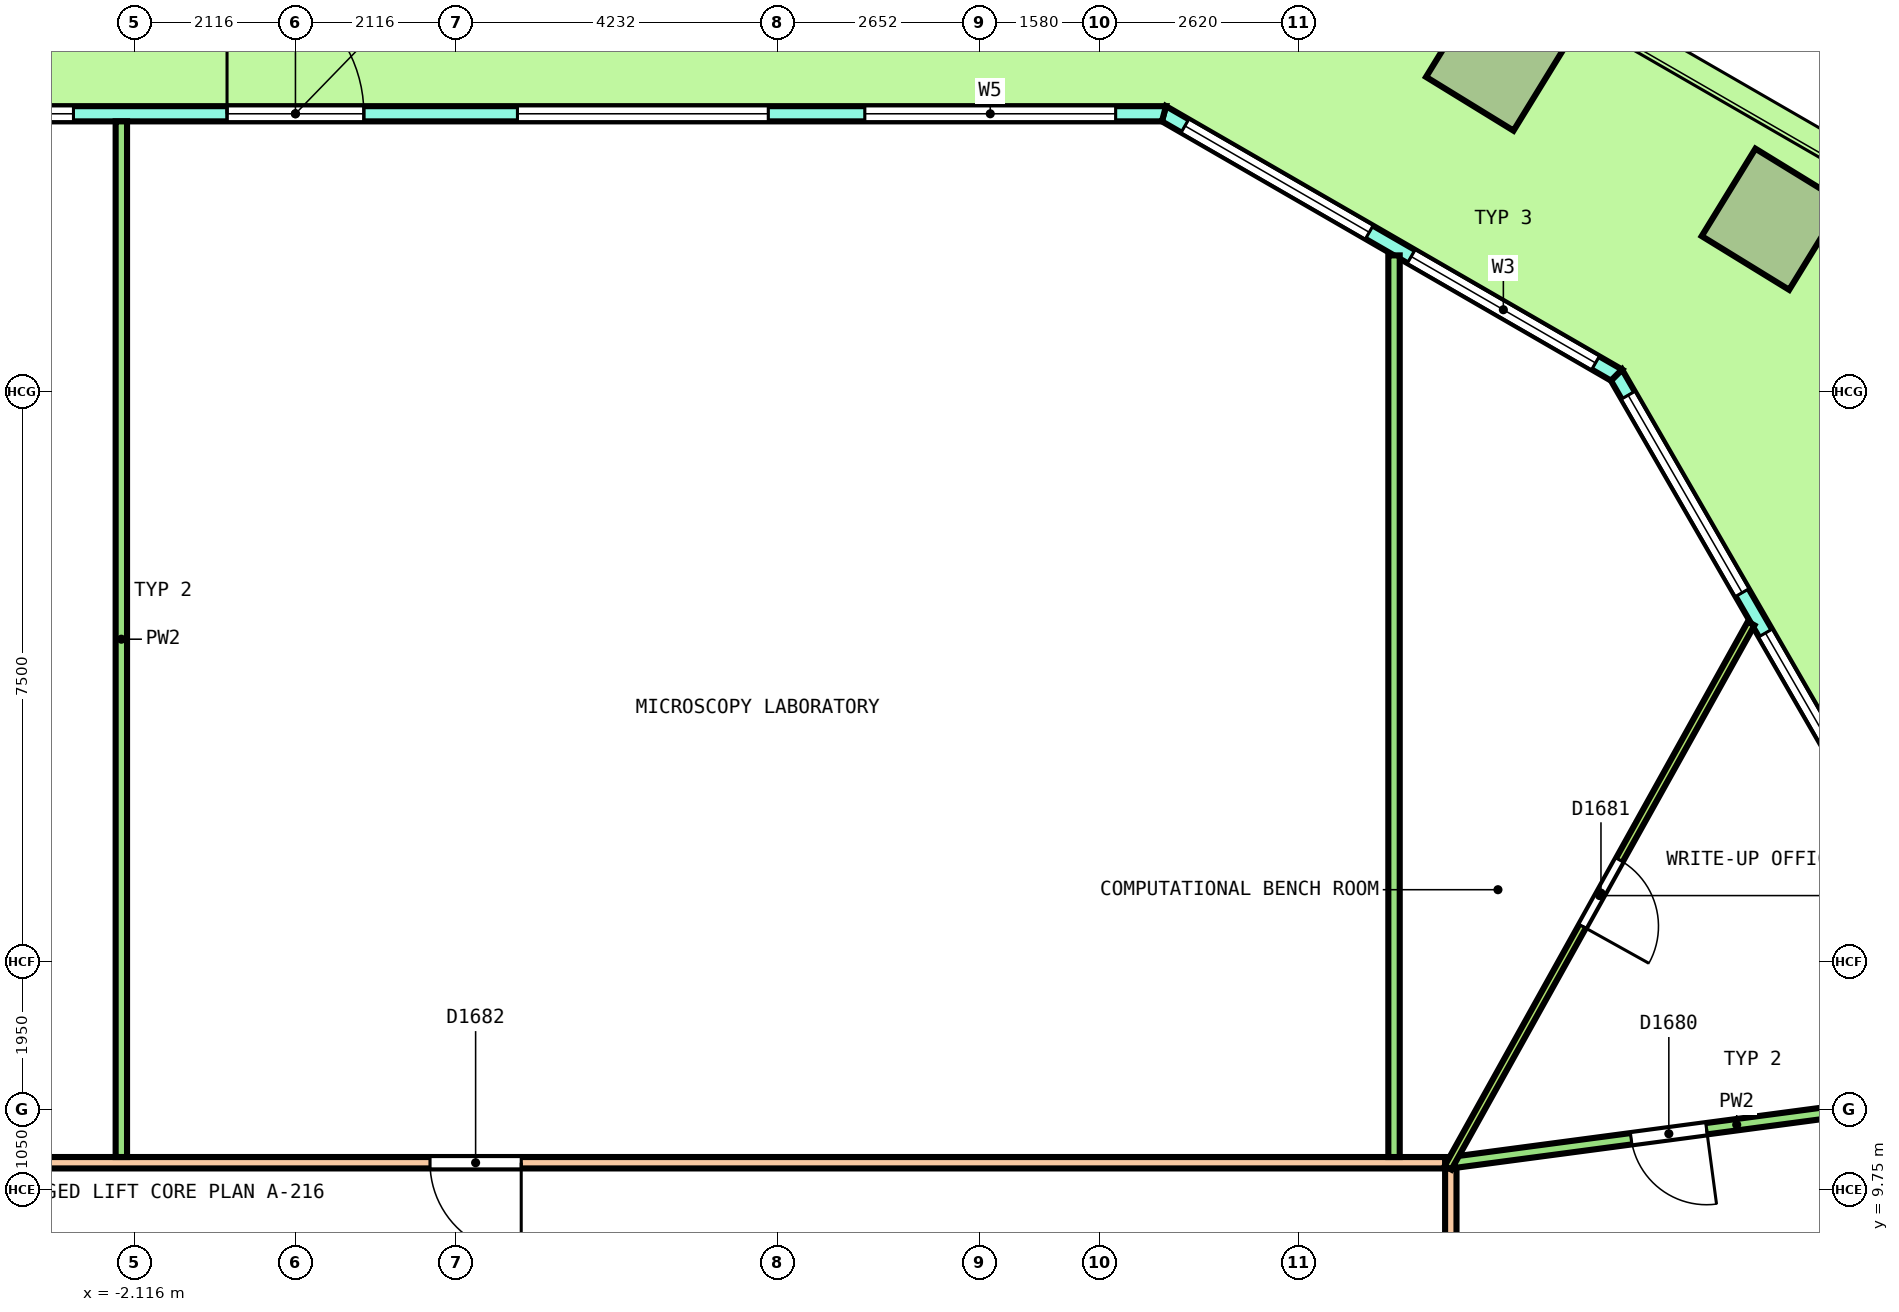
"""IFC4 building model, lengths in metres.
Left out: names, types, materials, properties, quantities, classifications, styles, units other than length and angle.
Written with IfcOpenShell. Run it as: python <this file> out.ifc"""

import sys

from ifc_helpers import new_model, si_unit, direction, frame, frame_2d, origin, origin_2d, place, context, subcontext, project, spatial, polyline, rectangle, outline, extrude, element, fill, save


model = new_model("IFC4")
c1 = context("Model", 3, precision=1e-05, world=origin(), true_north=direction((0.0, 1.0)))
c2 = subcontext(c1, "Body", "Model", "MODEL_VIEW")
j1 = project(units=[si_unit("LENGTHUNIT", "METRE"), si_unit("PLANEANGLEUNIT", "RADIAN")], contexts=[c1])
p1 = place(None, origin())
s1 = spatial("IfcSite", under=j1, at=p1, CompositionType="ELEMENT")
p2 = place(p1, origin())
s2 = spatial("IfcBuilding", under=s1, at=p2, CompositionType="ELEMENT")
p3 = place(p2, frame((0.0, 0.0, 135.2)))
s3 = spatial("IfcBuildingStorey", under=s2, at=p3, CompositionType="ELEMENT", Elevation=135.2)
p4 = place(p3, frame((21.386, 19.124, 0.0), z_axis=(-0.309930766279, -0.059635152069, 0.948887015799), x_axis=(-0.470498954611, 0.8768780975, -0.098567417711)))
e1 = element("IfcColumn", 1, at=p4, inside=s3, PredefinedType="COLUMN", context=c2, shape_type="SweptSolid", body=[
    extrude(rectangle(XDim=1.35, YDim=1.35, at=origin_2d()), origin(), (0.0, 0.0, 1.0), 4.258),
])
for number, where, z_axis, x_axis in (
    (2, (19.43, 22.512, 0.0), (-0.341, 0.0, 0.94), (-0.801, 0.523, -0.291)),
    (3, (15.803, 24.606, 0.0), (-0.341, 0.0, 0.94), (-0.801, 0.523, -0.291)),
):
    element("IfcColumn", number, at=place(p3, frame(where, z_axis=z_axis, x_axis=x_axis)), inside=s3, PredefinedType="COLUMN", context=c2, shape_type="SweptSolid", body=[
        extrude(rectangle(XDim=1.35, YDim=1.35, at=origin_2d()), origin(), (0.0, 0.0, 1.0), 4.298),
    ])
p5 = place(p3, frame((26.411, 4.82, 0.0), z_axis=(0.0, 0.0, 1.0), x_axis=(-0.500000137386, 0.866025324465, 0.0)))
e4 = element("IfcWall", 4, at=p5, inside=s3, PredefinedType="SOLIDWALL", context=c2, shape_type="SweptSolid", body=[
    extrude(outline(polyline([(-0.027, -0.1), (0.979, -0.1), (1.986, -0.1), (2.992, -0.1), (3.999, -0.1), (5.005, -0.1), (6.012, -0.1), (7.018, -0.1), (8.025, -0.1), (9.031, -0.1), (10.038, -0.1), (11.044, -0.1), (12.051, -0.1), (13.057, -0.1), (14.063, -0.1), (15.07, -0.1), (16.076, -0.1), (17.083, -0.1), (18.089, -0.1), (18.036, 0.1), (17.035, 0.1), (16.035, 0.1), (15.034, 0.1), (14.034, 0.1), (13.033, 0.1), (12.033, 0.1), (11.032, 0.1), (10.032, 0.1), (9.031, 0.1), (8.031, 0.1), (7.03, 0.1), (6.03, 0.1), (5.029, 0.1), (4.029, 0.1), (3.028, 0.1), (2.028, 0.1), (1.027, 0.1), (0.027, 0.1), (-0.027, -0.1)])), origin(), (0.0, 0.0, 1.0), 4.1),
])
p6 = place(p5, frame((0.306, 0.0, 0.1)))
e5 = element("IfcOpeningElement", 5, at=p6, cuts=e4, PredefinedType="OPENING", context=c2, shape_type="SweptSolid", body=[
    extrude(rectangle(XDim=3.0, YDim=2.9, at=frame_2d((1.5, 1.45))), frame((0.0, 0.11, 0.0), z_axis=(0.0, -1.0, 0.0), x_axis=(1.0, 0.0, 0.0)), (0.0, 0.0, 1.0), 0.22),
])
p7 = place(p5, frame((3.919, 0.0, 0.1)))
e6 = element("IfcOpeningElement", 6, at=p7, cuts=e4, PredefinedType="OPENING", context=c2, shape_type="SweptSolid", body=[
    extrude(rectangle(XDim=3.0, YDim=2.9, at=frame_2d((1.5, 1.45))), frame((0.0, 0.11, 0.0), z_axis=(0.0, -1.0, 0.0), x_axis=(1.0, 0.0, 0.0)), (0.0, 0.0, 1.0), 0.22),
])
p8 = place(p5, frame((8.131, 0.0, 0.0)))
e7 = element("IfcOpeningElement", 7, at=p8, cuts=e4, PredefinedType="OPENING", context=c2, shape_type="SweptSolid", body=[
    extrude(rectangle(XDim=1.8, YDim=2.4, at=frame_2d((0.9, 1.2))), frame((0.0, 0.11, 0.0), z_axis=(0.0, -1.0, 0.0), x_axis=(1.0, 0.0, 0.0)), (0.0, 0.0, 1.0), 0.22),
])
p9 = place(p5, frame((8.131, 0.0, 2.55)))
e8 = element("IfcOpeningElement", 8, at=p9, cuts=e4, PredefinedType="OPENING", context=c2, shape_type="SweptSolid", body=[
    extrude(rectangle(XDim=1.8, YDim=0.45, at=frame_2d((0.9, 0.225))), frame((0.0, 0.11, 0.0), z_axis=(0.0, -1.0, 0.0), x_axis=(1.0, 0.0, 0.0)), (0.0, 0.0, 1.0), 0.22),
])
p10 = place(p5, frame((11.144, 0.0, 0.1)))
e9 = element("IfcOpeningElement", 9, at=p10, cuts=e4, PredefinedType="OPENING", context=c2, shape_type="SweptSolid", body=[
    extrude(rectangle(XDim=3.0, YDim=2.9, at=frame_2d((1.5, 1.45))), frame((0.0, 0.11, 0.0), z_axis=(0.0, -1.0, 0.0), x_axis=(1.0, 0.0, 0.0)), (0.0, 0.0, 1.0), 0.22),
])
p11 = place(p5, frame((14.756, 0.0, 0.1)))
e10 = element("IfcOpeningElement", 10, at=p11, cuts=e4, PredefinedType="OPENING", context=c2, shape_type="SweptSolid", body=[
    extrude(rectangle(XDim=3.0, YDim=2.9, at=frame_2d((1.5, 1.45))), frame((0.0, 0.11, 0.0), z_axis=(0.0, -1.0, 0.0), x_axis=(1.0, 0.0, 0.0)), (0.0, 0.0, 1.0), 0.22),
])
p12 = place(p3, frame((17.38, 20.463, 0.0), z_axis=(0.0, 0.0, 1.0), x_axis=(-0.866029458321, 0.49999297727, 0.0)))
e11 = element("IfcWall", 11, at=p12, inside=s3, PredefinedType="SOLIDWALL", context=c2, shape_type="SweptSolid", body=[
    extrude(outline(polyline([(-0.027, -0.1), (1.128, -0.1), (2.282, -0.1), (3.437, -0.1), (4.592, -0.1), (5.747, -0.1), (6.901, -0.1), (6.848, 0.1), (5.711, 0.1), (4.574, 0.1), (3.437, 0.1), (2.301, 0.1), (1.164, 0.1), (0.027, 0.1), (-0.027, -0.1)])), origin(), (0.0, 0.0, 1.0), 4.1),
])
p13 = place(p12, frame((0.319, 0.0, 0.1)))
e12 = element("IfcOpeningElement", 12, at=p13, cuts=e11, PredefinedType="OPENING", context=c2, shape_type="SweptSolid", body=[
    extrude(rectangle(XDim=2.8, YDim=2.9, at=frame_2d((1.4, 1.45))), frame((0.0, 0.11, 0.0), z_axis=(0.0, -1.0, 0.0), x_axis=(1.0, 0.0, 0.0)), (0.0, 0.0, 1.0), 0.22),
])
p14 = place(p12, frame((3.756, 0.0, 0.1)))
e13 = element("IfcOpeningElement", 13, at=p14, cuts=e11, PredefinedType="OPENING", context=c2, shape_type="SweptSolid", body=[
    extrude(rectangle(XDim=2.8, YDim=2.9, at=frame_2d((1.4, 1.45))), frame((0.0, 0.11, 0.0), z_axis=(0.0, -1.0, 0.0), x_axis=(1.0, 0.0, 0.0)), (0.0, 0.0, 1.0), 0.22),
])
p15 = place(p3, frame((11.426, 23.9, 0.0), z_axis=(0.0, 0.0, 1.0), x_axis=(-1.0, 0.0, 0.0)))
e14 = element("IfcWall", 14, at=p15, inside=s3, PredefinedType="SOLIDWALL", context=c2, shape_type="SweptSolid", body=[
    extrude(outline(polyline([(-0.027, -0.1), (1.014, -0.1), (2.055, -0.1), (3.097, -0.1), (4.138, -0.1), (5.179, -0.1), (6.22, -0.1), (7.261, -0.1), (8.303, -0.1), (9.344, -0.1), (10.385, -0.1), (11.426, -0.1), (12.468, -0.1), (13.509, -0.1), (14.55, -0.1), (15.591, -0.1), (16.632, -0.1), (17.673, -0.1), (18.715, -0.1), (19.756, -0.1), (20.797, -0.1), (21.838, -0.1), (22.879, -0.1), (22.826, 0.1), (21.789, 0.1), (20.753, 0.1), (19.717, 0.1), (18.68, 0.1), (17.644, 0.1), (16.608, 0.1), (15.572, 0.1), (14.535, 0.1), (13.499, 0.1), (12.463, 0.1), (11.426, 0.1), (10.39, 0.1), (9.354, 0.1), (8.317, 0.1), (7.281, 0.1), (6.245, 0.1), (5.208, 0.1), (4.172, 0.1), (3.136, 0.1), (2.099, 0.1), (1.063, 0.1), (0.027, 0.1), (-0.027, -0.1)])), origin(), (0.0, 0.0, 1.0), 4.1),
])
p16 = place(p15, frame((0.635, 0.0, 0.1)))
e15 = element("IfcOpeningElement", 15, at=p16, cuts=e14, PredefinedType="OPENING", context=c2, shape_type="SweptSolid", body=[
    extrude(rectangle(XDim=3.3, YDim=2.9, at=frame_2d((1.65, 1.45))), frame((0.0, 0.11, 0.0), z_axis=(0.0, -1.0, 0.0), x_axis=(1.0, 0.0, 0.0)), (0.0, 0.0, 1.0), 0.22),
])
p17 = place(p15, frame((5.206, 0.0, 0.1)))
e16 = element("IfcOpeningElement", 16, at=p17, cuts=e14, PredefinedType="OPENING", context=c2, shape_type="SweptSolid", body=[
    extrude(rectangle(XDim=3.3, YDim=2.9, at=frame_2d((1.65, 1.45))), frame((0.0, 0.11, 0.0), z_axis=(0.0, -1.0, 0.0), x_axis=(1.0, 0.0, 0.0)), (0.0, 0.0, 1.0), 0.22),
])
p18 = place(p15, frame((10.526, 0.0, 0.0)))
e17 = element("IfcOpeningElement", 17, at=p18, cuts=e14, PredefinedType="OPENING", context=c2, shape_type="SweptSolid", body=[
    extrude(rectangle(XDim=1.8, YDim=2.4, at=frame_2d((0.9, 1.2))), frame((0.0, 0.11, 0.0), z_axis=(0.0, -1.0, 0.0), x_axis=(1.0, 0.0, 0.0)), (0.0, 0.0, 1.0), 0.22),
])
p19 = place(p15, frame((10.526, 0.0, 2.55)))
e18 = element("IfcOpeningElement", 18, at=p19, cuts=e14, PredefinedType="OPENING", context=c2, shape_type="SweptSolid", body=[
    extrude(rectangle(XDim=1.8, YDim=0.45, at=frame_2d((0.9, 0.225))), frame((0.0, 0.11, 0.0), z_axis=(0.0, -1.0, 0.0), x_axis=(1.0, 0.0, 0.0)), (0.0, 0.0, 1.0), 0.22),
])
p20 = place(p15, frame((14.347, 0.0, 0.1)))
e19 = element("IfcOpeningElement", 19, at=p20, cuts=e14, PredefinedType="OPENING", context=c2, shape_type="SweptSolid", body=[
    extrude(rectangle(XDim=3.3, YDim=2.9, at=frame_2d((1.65, 1.45))), frame((0.0, 0.11, 0.0), z_axis=(0.0, -1.0, 0.0), x_axis=(1.0, 0.0, 0.0)), (0.0, 0.0, 1.0), 0.22),
])
p21 = place(p15, frame((18.917, 0.0, 0.1)))
e20 = element("IfcOpeningElement", 20, at=p21, cuts=e14, PredefinedType="OPENING", context=c2, shape_type="SweptSolid", body=[
    extrude(rectangle(XDim=3.3, YDim=2.9, at=frame_2d((1.65, 1.45))), frame((0.0, 0.11, 0.0), z_axis=(0.0, -1.0, 0.0), x_axis=(1.0, 0.0, 0.0)), (0.0, 0.0, 1.0), 0.22),
])
p22 = place(p3, frame((15.2, 0.576, 0.0), z_axis=(0.0, 0.0, 1.0), x_axis=(0.0, 1.0, 0.0)))
e21 = element("IfcWall", 21, at=p22, inside=s3, PredefinedType="PARTITIONING", context=c2, shape_type="SweptSolid", body=[
    extrude(rectangle(XDim=9.449, YDim=0.15, at=frame_2d((4.725, 0.0))), origin(), (0.0, 0.0, 1.0), 3.05),
])
p23 = place(p3, frame((-15.125, 10.1, 0.0), z_axis=(0.0, 0.0, 1.0), x_axis=(1.0, 0.0, 0.0)))
e22 = element("IfcWall", 22, at=p23, inside=s3, PredefinedType="PARTITIONING", context=c2, shape_type="SweptSolid", body=[
    extrude(rectangle(XDim=30.25, YDim=0.15, at=frame_2d((15.125, 0.0))), origin(), (0.0, 0.0, 1.0), 3.05),
])
p24 = place(p23, frame((16.895, 0.0, 0.0)))
e23 = element("IfcOpeningElement", 23, at=p24, cuts=e22, PredefinedType="OPENING", context=c2, shape_type="SweptSolid", body=[
    extrude(rectangle(XDim=1.2, YDim=2.1, at=frame_2d((0.6, 1.05))), frame((0.0, 0.085, 0.0), z_axis=(0.0, -1.0, 0.0), x_axis=(1.0, 0.0, 0.0)), (0.0, 0.0, 1.0), 0.17),
])
p25 = place(p23, frame((6.564, 0.0, 0.0)))
e24 = element("IfcOpeningElement", 24, at=p25, cuts=e22, PredefinedType="OPENING", context=c2, shape_type="SweptSolid", body=[
    extrude(rectangle(XDim=1.2, YDim=2.1, at=frame_2d((0.6, 1.05))), frame((0.0, 0.085, 0.0), z_axis=(0.0, -1.0, 0.0), x_axis=(1.0, 0.0, 0.0)), (0.0, 0.0, 1.0), 0.17),
])
p26 = place(p23, frame((1.476, 0.0, 0.0)))
e25 = element("IfcOpeningElement", 25, at=p26, cuts=e22, PredefinedType="OPENING", context=c2, shape_type="SweptSolid", body=[
    extrude(rectangle(XDim=1.2, YDim=2.1, at=frame_2d((0.6, 1.05))), frame((0.0, 0.085, 0.0), z_axis=(0.0, -1.0, 0.0), x_axis=(1.0, 0.0, 0.0)), (0.0, 0.0, 1.0), 0.17),
])
p27 = place(p3, frame((15.25, 10.107, 0.0), z_axis=(0.0, 0.0, 1.0), x_axis=(0.991272259153, 0.131830604315, 0.0)))
e26 = element("IfcWall", 26, at=p27, inside=s3, PredefinedType="PARTITIONING", context=c2, shape_type="SweptSolid", body=[
    extrude(rectangle(XDim=7.489, YDim=0.15, at=frame_2d((3.745, 0.0))), origin(), (0.0, 0.0, 1.0), 3.05),
])
p28 = place(p27, frame((2.344, 0.0, 0.0)))
e27 = element("IfcOpeningElement", 27, at=p28, cuts=e26, PredefinedType="OPENING", context=c2, shape_type="SweptSolid", body=[
    extrude(rectangle(XDim=1.0, YDim=2.1, at=frame_2d((0.5, 1.05))), frame((0.0, 0.085, 0.0), z_axis=(0.0, -1.0, 0.0), x_axis=(1.0, 0.0, 0.0)), (0.0, 0.0, 1.0), 0.17),
])
p29 = place(p3, frame((14.453, 10.175, 0.0), z_axis=(0.0, 0.0, 1.0), x_axis=(0.0, 1.0, 0.0)))
e28 = element("IfcWall", 28, at=p29, inside=s3, PredefinedType="PARTITIONING", context=c2, shape_type="SweptSolid", body=[
    extrude(rectangle(XDim=11.862, YDim=0.15, at=frame_2d((5.931, 0.0))), origin(), (0.0, 0.0, 1.0), 3.05),
])
p30 = place(p3, frame((-2.291, 10.175, 0.0), z_axis=(0.0, 0.0, 1.0), x_axis=(0.0, 1.0, 0.0)))
e29 = element("IfcWall", 29, at=p30, inside=s3, PredefinedType="PARTITIONING", context=c2, shape_type="SweptSolid", body=[
    extrude(rectangle(XDim=13.625, YDim=0.15, at=frame_2d((6.812, 0.0))), origin(), (0.0, 0.0, 1.0), 3.05),
])
p31 = place(p3, frame((15.164, 10.034, 0.0), z_axis=(0.0, 0.0, 1.0), x_axis=(0.486568356271, 0.873642509655, 0.0)))
e30 = element("IfcWall", 30, at=p31, inside=s3, PredefinedType="PARTITIONING", context=c2, shape_type="SweptSolid", body=[
    extrude(rectangle(XDim=8.196, YDim=0.1, at=frame_2d((4.098, 0.0))), origin(), (0.0, 0.0, 1.0), 3.05),
])
p32 = place(p31, frame((3.635, 0.0, 0.0)))
e31 = element("IfcOpeningElement", 31, at=p32, cuts=e30, PredefinedType="OPENING", context=c2, shape_type="SweptSolid", body=[
    extrude(rectangle(XDim=1.0, YDim=2.1, at=frame_2d((0.5, 1.05))), frame((0.0, 0.06, 0.0), z_axis=(0.0, -1.0, 0.0), x_axis=(1.0, 0.0, 0.0)), (0.0, 0.0, 1.0), 0.12),
])
p33 = place(p10, origin())
e32 = element("IfcWindow", 32, at=p33, inside=s3, PartitioningType="SINGLE_PANEL", PredefinedType="WINDOW", context=c2, shape_type="SweptSolid", body=[
    extrude(rectangle(XDim=3.0, YDim=2.9, at=frame_2d((1.5, 1.45))), frame((0.0, 0.03, 0.0), z_axis=(0.0, -1.0, 0.0), x_axis=(1.0, 0.0, 0.0)), (0.0, 0.0, 1.0), 0.06),
])
fill(e9, e32)
p34 = place(p11, origin())
e33 = element("IfcWindow", 33, at=p34, inside=s3, PartitioningType="SINGLE_PANEL", PredefinedType="WINDOW", context=c2, shape_type="SweptSolid", body=[
    extrude(rectangle(XDim=3.0, YDim=2.9, at=frame_2d((1.5, 1.45))), frame((0.0, 0.03, 0.0), z_axis=(0.0, -1.0, 0.0), x_axis=(1.0, 0.0, 0.0)), (0.0, 0.0, 1.0), 0.06),
])
fill(e10, e33)
p35 = place(p13, origin())
e34 = element("IfcWindow", 34, at=p35, inside=s3, PartitioningType="SINGLE_PANEL", PredefinedType="WINDOW", context=c2, shape_type="SweptSolid", body=[
    extrude(rectangle(XDim=2.8, YDim=2.9, at=frame_2d((1.4, 1.45))), frame((0.0, 0.03, 0.0), z_axis=(0.0, -1.0, 0.0), x_axis=(1.0, 0.0, 0.0)), (0.0, 0.0, 1.0), 0.06),
])
fill(e12, e34)
p36 = place(p14, origin())
e35 = element("IfcWindow", 35, at=p36, inside=s3, PartitioningType="SINGLE_PANEL", PredefinedType="WINDOW", context=c2, shape_type="SweptSolid", body=[
    extrude(rectangle(XDim=2.8, YDim=2.9, at=frame_2d((1.4, 1.45))), frame((0.0, 0.03, 0.0), z_axis=(0.0, -1.0, 0.0), x_axis=(1.0, 0.0, 0.0)), (0.0, 0.0, 1.0), 0.06),
])
fill(e13, e35)
p37 = place(p16, origin())
e36 = element("IfcWindow", 36, at=p37, inside=s3, PartitioningType="SINGLE_PANEL", PredefinedType="WINDOW", context=c2, shape_type="SweptSolid", body=[
    extrude(rectangle(XDim=3.3, YDim=2.9, at=frame_2d((1.65, 1.45))), frame((0.0, 0.03, 0.0), z_axis=(0.0, -1.0, 0.0), x_axis=(1.0, 0.0, 0.0)), (0.0, 0.0, 1.0), 0.06),
])
fill(e15, e36)
p38 = place(p17, origin())
e37 = element("IfcWindow", 37, at=p38, inside=s3, PartitioningType="SINGLE_PANEL", PredefinedType="WINDOW", context=c2, shape_type="SweptSolid", body=[
    extrude(rectangle(XDim=3.3, YDim=2.9, at=frame_2d((1.65, 1.45))), frame((0.0, 0.03, 0.0), z_axis=(0.0, -1.0, 0.0), x_axis=(1.0, 0.0, 0.0)), (0.0, 0.0, 1.0), 0.06),
])
fill(e16, e37)
p39 = place(p18, origin())
e38 = element("IfcDoor", 38, at=p39, inside=s3, OperationType="DOUBLE_DOOR_SINGLE_SWING", PredefinedType="DOOR", context=c2, shape_type="SweptSolid", body=[
    extrude(rectangle(XDim=1.8, YDim=2.4, at=frame_2d((0.9, 1.2))), frame((0.0, 0.025, 0.0), z_axis=(0.0, -1.0, 0.0), x_axis=(1.0, 0.0, 0.0)), (0.0, 0.0, 1.0), 0.05),
])
fill(e17, e38)
p40 = place(p19, origin())
e39 = element("IfcWindow", 39, at=p40, inside=s3, PartitioningType="SINGLE_PANEL", PredefinedType="WINDOW", context=c2, shape_type="SweptSolid", body=[
    extrude(rectangle(XDim=1.8, YDim=0.45, at=frame_2d((0.9, 0.225))), frame((0.0, 0.03, 0.0), z_axis=(0.0, -1.0, 0.0), x_axis=(1.0, 0.0, 0.0)), (0.0, 0.0, 1.0), 0.06),
])
fill(e18, e39)
p41 = place(p20, origin())
e40 = element("IfcWindow", 40, at=p41, inside=s3, PartitioningType="SINGLE_PANEL", PredefinedType="WINDOW", context=c2, shape_type="SweptSolid", body=[
    extrude(rectangle(XDim=3.3, YDim=2.9, at=frame_2d((1.65, 1.45))), frame((0.0, 0.03, 0.0), z_axis=(0.0, -1.0, 0.0), x_axis=(1.0, 0.0, 0.0)), (0.0, 0.0, 1.0), 0.06),
])
fill(e19, e40)
p42 = place(p28, origin())
e41 = element("IfcDoor", 41, at=p42, inside=s3, OperationType="SINGLE_SWING_RIGHT", PredefinedType="DOOR", context=c2, shape_type="SweptSolid", body=[
    extrude(rectangle(XDim=1.0, YDim=2.1, at=frame_2d((0.5, 1.05))), frame((0.0, 0.025, 0.0), z_axis=(0.0, -1.0, 0.0), x_axis=(1.0, 0.0, 0.0)), (0.0, 0.0, 1.0), 0.05),
])
fill(e27, e41)
p43 = place(p32, origin())
e42 = element("IfcDoor", 42, at=p43, inside=s3, OperationType="SINGLE_SWING_LEFT", PredefinedType="DOOR", context=c2, shape_type="SweptSolid", body=[
    extrude(rectangle(XDim=1.0, YDim=2.1, at=frame_2d((0.5, 1.05))), frame((0.0, 0.025, 0.0), z_axis=(0.0, -1.0, 0.0), x_axis=(1.0, 0.0, 0.0)), (0.0, 0.0, 1.0), 0.05),
])
fill(e31, e42)
p44 = place(p24, origin())
e43 = element("IfcDoor", 43, at=p44, inside=s3, OperationType="DOUBLE_DOOR_SINGLE_SWING", PredefinedType="DOOR", context=c2, shape_type="SweptSolid", body=[
    extrude(rectangle(XDim=1.2, YDim=2.1, at=frame_2d((0.6, 1.05))), frame((0.0, 0.025, 0.0), z_axis=(0.0, -1.0, 0.0), x_axis=(1.0, 0.0, 0.0)), (0.0, 0.0, 1.0), 0.05),
])
fill(e23, e43)
save(model, sys.argv[1])
